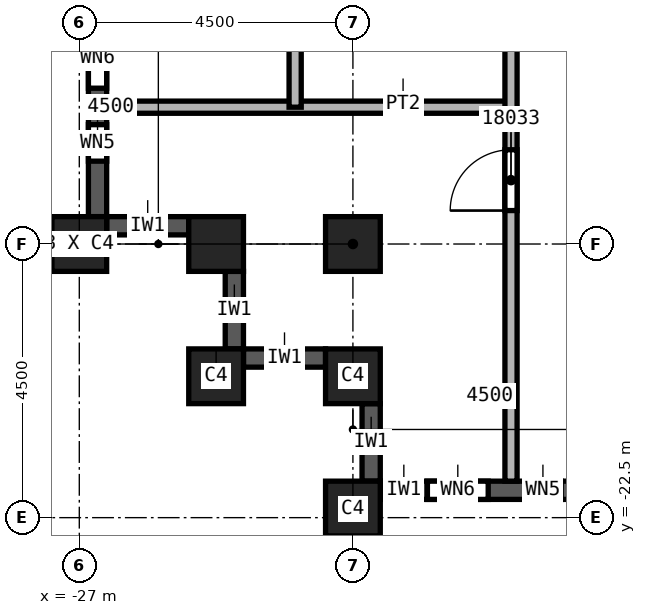
"""IFC4 building model, lengths in metres.
Left out: names, types, materials, properties, quantities, classifications, styles, units other than length and angle.
Written with IfcOpenShell. Run it as: python <this file> out.ifc"""

import sys

from ifc_helpers import new_model, si_unit, direction, frame, frame_2d, origin, origin_2d, place, context, subcontext, project, spatial, rectangle, extrude, element, fill, save


model = new_model("IFC4")
c1 = context("Model", 3, precision=1e-05, world=origin(), true_north=direction((0.0, 1.0)))
c2 = subcontext(c1, "Body", "Model", "MODEL_VIEW")
j1 = project(units=[si_unit("LENGTHUNIT", "METRE"), si_unit("PLANEANGLEUNIT", "RADIAN")], contexts=[c1])
p1 = place(None, origin())
s1 = spatial("IfcSite", under=j1, at=p1, CompositionType="ELEMENT")
p2 = place(p1, origin())
s2 = spatial("IfcBuilding", under=s1, at=p2, CompositionType="ELEMENT")
p3 = place(p2, frame((0.0, 0.0, 266.0)))
s3 = spatial("IfcBuildingStorey", under=s2, at=p3, CompositionType="ELEMENT", Elevation=266.0)
for number, where, z_axis, x_axis in (
    (1, (-22.5, -18.0, 0.0), (0.0, 0.0, 1.0), (1.0, 0.0, 0.0)),
    (2, (-22.5, -22.35, 0.0), (0.0, 0.0, 1.0), (1.0, 0.0, 0.0)),
    (3, (-27.0, -18.0, 0.0), (0.0, 0.0, 1.0), (0.0, 1.0, 0.0)),
    (4, (-22.5, -20.175, 0.0), (0.0, 0.0, 1.0), (1.0, 0.0, 0.0)),
    (5, (-24.75, -20.175, 0.0), (0.0, 0.0, 1.0), (1.0, 0.0, 0.0)),
    (6, (-24.75, -18.0, 0.0), (0.0, 0.0, 1.0), (1.0, 0.0, 0.0)),
):
    element("IfcColumn", number, at=place(p3, frame(where, z_axis=z_axis, x_axis=x_axis)), inside=s3, PredefinedType="COLUMN", context=c2, shape_type="SweptSolid", body=[
        extrude(rectangle(XDim=0.9, YDim=0.9, at=origin_2d()), origin(), (0.0, 0.0, 1.0), 3.72),
    ])
p4 = place(p3, frame((-26.7, -9.45, 0.0), z_axis=(0.0, 0.0, 1.0), x_axis=(0.0, -1.0, 0.0)))
e7 = element("IfcWall", 7, at=p4, inside=s3, PredefinedType="SOLIDWALL", context=c2, shape_type="SweptSolid", body=[
    extrude(rectangle(XDim=8.1, YDim=0.3, at=frame_2d((4.05, 0.0))), origin(), (0.0, 0.0, 1.0), 3.12),
])
p5 = place(p4, frame((0.825, 0.0, 0.8)))
e8 = element("IfcOpeningElement", 8, at=p5, cuts=e7, PredefinedType="OPENING", context=c2, shape_type="SweptSolid", body=[
    extrude(rectangle(XDim=2.4, YDim=1.95, at=frame_2d((1.2, 0.975))), frame((0.0, 0.15, 0.0), z_axis=(0.0, -1.0, 0.0), x_axis=(1.0, 0.0, 0.0)), (0.0, 0.0, 1.0), 0.3),
])
p6 = place(p4, frame((4.988, 0.0, 0.8)))
e9 = element("IfcOpeningElement", 9, at=p6, cuts=e7, PredefinedType="OPENING", context=c2, shape_type="SweptSolid", body=[
    extrude(rectangle(XDim=1.0, YDim=1.95, at=frame_2d((0.5, 0.975))), frame((0.0, 0.15, 0.0), z_axis=(0.0, -1.0, 0.0), x_axis=(1.0, 0.0, 0.0)), (0.0, 0.0, 1.0), 0.3),
])
p7 = place(p4, frame((6.587, 0.0, 0.8)))
e10 = element("IfcOpeningElement", 10, at=p7, cuts=e7, PredefinedType="OPENING", context=c2, shape_type="SweptSolid", body=[
    extrude(rectangle(XDim=0.6, YDim=1.95, at=frame_2d((0.3, 0.975))), frame((0.0, 0.15, 0.0), z_axis=(0.0, -1.0, 0.0), x_axis=(1.0, 0.0, 0.0)), (0.0, 0.0, 1.0), 0.3),
])
p8 = place(p3, frame((-26.55, -17.7, 0.0), z_axis=(0.0, 0.0, 1.0), x_axis=(1.0, 0.0, 0.0)))
e11 = element("IfcWall", 11, at=p8, inside=s3, PredefinedType="SOLIDWALL", context=c2, shape_type="SweptSolid", body=[
    extrude(rectangle(XDim=1.35, YDim=0.3, at=frame_2d((0.675, 0.0))), origin(), (0.0, 0.0, 1.0), 3.12),
])
p9 = place(p3, frame((-24.45, -18.45, 0.0), z_axis=(0.0, 0.0, 1.0), x_axis=(0.0, -1.0, 0.0)))
e12 = element("IfcWall", 12, at=p9, inside=s3, PredefinedType="SOLIDWALL", context=c2, shape_type="SweptSolid", body=[
    extrude(rectangle(XDim=1.275, YDim=0.3, at=frame_2d((0.638, 0.0))), origin(), (0.0, 0.0, 1.0), 3.12),
])
p10 = place(p3, frame((-24.3, -19.875, 0.0), z_axis=(0.0, 0.0, 1.0), x_axis=(1.0, 0.0, 0.0)))
e13 = element("IfcWall", 13, at=p10, inside=s3, PredefinedType="SOLIDWALL", context=c2, shape_type="SweptSolid", body=[
    extrude(rectangle(XDim=1.35, YDim=0.3, at=frame_2d((0.675, 0.0))), origin(), (0.0, 0.0, 1.0), 3.12),
])
p11 = place(p3, frame((-22.2, -20.625, 0.0), z_axis=(0.0, 0.0, 1.0), x_axis=(0.0, -1.0, 0.0)))
e14 = element("IfcWall", 14, at=p11, inside=s3, PredefinedType="SOLIDWALL", context=c2, shape_type="SweptSolid", body=[
    extrude(rectangle(XDim=1.275, YDim=0.3, at=frame_2d((0.637, 0.0))), origin(), (0.0, 0.0, 1.0), 3.12),
])
p12 = place(p3, frame((-22.05, -22.05, 0.0), z_axis=(0.0, 0.0, 1.0), x_axis=(1.0, 0.0, 0.0)))
e15 = element("IfcWall", 15, at=p12, inside=s3, PredefinedType="SOLIDWALL", context=c2, shape_type="SweptSolid", body=[
    extrude(rectangle(XDim=3.6, YDim=0.3, at=frame_2d((1.8, 0.0))), origin(), (0.0, 0.0, 1.0), 3.12),
])
p13 = place(p12, frame((0.775, 0.0, 0.8)))
e16 = element("IfcOpeningElement", 16, at=p13, cuts=e15, PredefinedType="OPENING", context=c2, shape_type="SweptSolid", body=[
    extrude(rectangle(XDim=1.0, YDim=1.95, at=frame_2d((0.5, 0.975))), frame((0.0, 0.15, 0.0), z_axis=(0.0, -1.0, 0.0), x_axis=(1.0, 0.0, 0.0)), (0.0, 0.0, 1.0), 0.3),
])
p14 = place(p12, frame((2.375, 0.0, 0.8)))
e17 = element("IfcOpeningElement", 17, at=p14, cuts=e15, PredefinedType="OPENING", context=c2, shape_type="SweptSolid", body=[
    extrude(rectangle(XDim=0.6, YDim=1.95, at=frame_2d((0.3, 0.975))), frame((0.0, 0.15, 0.0), z_axis=(0.0, -1.0, 0.0), x_axis=(1.0, 0.0, 0.0)), (0.0, 0.0, 1.0), 0.3),
])
p15 = place(p3, frame((-26.55, -15.75, 0.0), z_axis=(0.0, 0.0, 1.0), x_axis=(1.0, 0.0, 0.0)))
e18 = element("IfcWall", 18, at=p15, inside=s3, PredefinedType="PARTITIONING", context=c2, shape_type="SweptSolid", body=[
    extrude(rectangle(XDim=6.65, YDim=0.2, at=frame_2d((3.325, 0.0))), origin(), (0.0, 0.0, 1.0), 3.72),
])
p16 = place(p3, frame((-23.45, -15.75, 0.0), z_axis=(0.0, 0.0, 1.0), x_axis=(0.0, 1.0, 0.0)))
e19 = element("IfcWall", 19, at=p16, inside=s3, PredefinedType="PARTITIONING", context=c2, shape_type="SweptSolid", body=[
    extrude(rectangle(XDim=15.75, YDim=0.2, at=frame_2d((7.875, 0.0))), origin(), (0.0, 0.0, 1.0), 3.72),
])
p17 = place(p16, frame((7.6, 0.0, 0.0)))
e20 = element("IfcOpeningElement", 20, at=p17, cuts=e19, PredefinedType="OPENING", context=c2, shape_type="SweptSolid", body=[
    extrude(rectangle(XDim=1.0, YDim=2.1, at=frame_2d((0.5, 1.05))), frame((0.0, 0.1, 0.0), z_axis=(0.0, -1.0, 0.0), x_axis=(1.0, 0.0, 0.0)), (0.0, 0.0, 1.0), 0.2),
])
p18 = place(p3, frame((-19.9, -21.9, 0.0), z_axis=(0.0, 0.0, 1.0), x_axis=(0.0, 1.0, 0.0)))
e21 = element("IfcWall", 21, at=p18, inside=s3, PredefinedType="PARTITIONING", context=c2, shape_type="SweptSolid", body=[
    extrude(rectangle(XDim=35.5, YDim=0.2, at=frame_2d((17.75, 0.0))), origin(), (0.0, 0.0, 1.0), 3.72),
])
p19 = place(p18, frame((22.95, 0.0, 0.0)))
e22 = element("IfcOpeningElement", 22, at=p19, cuts=e21, PredefinedType="OPENING", context=c2, shape_type="SweptSolid", body=[
    extrude(rectangle(XDim=1.0, YDim=2.1, at=frame_2d((0.5, 1.05))), frame((0.0, 0.1, 0.0), z_axis=(0.0, -1.0, 0.0), x_axis=(1.0, 0.0, 0.0)), (0.0, 0.0, 1.0), 0.2),
])
p20 = place(p18, frame((28.8, 0.0, 0.0)))
e23 = element("IfcOpeningElement", 23, at=p20, cuts=e21, PredefinedType="OPENING", context=c2, shape_type="SweptSolid", body=[
    extrude(rectangle(XDim=1.0, YDim=2.1, at=frame_2d((0.5, 1.05))), frame((0.0, 0.1, 0.0), z_axis=(0.0, -1.0, 0.0), x_axis=(1.0, 0.0, 0.0)), (0.0, 0.0, 1.0), 0.2),
])
p21 = place(p18, frame((34.2, 0.0, 0.0)))
e24 = element("IfcOpeningElement", 24, at=p21, cuts=e21, PredefinedType="OPENING", context=c2, shape_type="SweptSolid", body=[
    extrude(rectangle(XDim=1.0, YDim=2.1, at=frame_2d((0.5, 1.05))), frame((0.0, 0.1, 0.0), z_axis=(0.0, -1.0, 0.0), x_axis=(1.0, 0.0, 0.0)), (0.0, 0.0, 1.0), 0.2),
])
p22 = place(p18, frame((4.45, 0.0, 0.0)))
e25 = element("IfcOpeningElement", 25, at=p22, cuts=e21, PredefinedType="OPENING", context=c2, shape_type="SweptSolid", body=[
    extrude(rectangle(XDim=1.0, YDim=2.1, at=frame_2d((0.5, 1.05))), frame((0.0, 0.1, 0.0), z_axis=(0.0, -1.0, 0.0), x_axis=(1.0, 0.0, 0.0)), (0.0, 0.0, 1.0), 0.2),
])
p23 = place(p18, frame((14.4, 0.0, 0.0)))
e26 = element("IfcOpeningElement", 26, at=p23, cuts=e21, PredefinedType="OPENING", context=c2, shape_type="SweptSolid", body=[
    extrude(rectangle(XDim=1.0, YDim=2.1, at=frame_2d((0.5, 1.05))), frame((0.0, 0.1, 0.0), z_axis=(0.0, -1.0, 0.0), x_axis=(1.0, 0.0, 0.0)), (0.0, 0.0, 1.0), 0.2),
])
p24 = place(p22, origin())
e27 = element("IfcDoor", 27, at=p24, inside=s3, OperationType="SINGLE_SWING_RIGHT", PredefinedType="DOOR", context=c2, shape_type="SweptSolid", body=[
    extrude(rectangle(XDim=1.0, YDim=2.1, at=frame_2d((0.5, 1.05))), frame((0.0, 0.025, 0.0), z_axis=(0.0, -1.0, 0.0), x_axis=(1.0, 0.0, 0.0)), (0.0, 0.0, 1.0), 0.05),
])
fill(e25, e27)
p25 = place(p6, origin())
e28 = element("IfcWindow", 28, at=p25, inside=s3, PartitioningType="SINGLE_PANEL", PredefinedType="WINDOW", context=c2, shape_type="SweptSolid", body=[
    extrude(rectangle(XDim=1.0, YDim=1.95, at=frame_2d((0.5, 0.975))), frame((0.0, 0.03, 0.0), z_axis=(0.0, -1.0, 0.0), x_axis=(1.0, 0.0, 0.0)), (0.0, 0.0, 1.0), 0.06),
])
fill(e9, e28)
p26 = place(p7, origin())
e29 = element("IfcWindow", 29, at=p26, inside=s3, PartitioningType="SINGLE_PANEL", PredefinedType="WINDOW", context=c2, shape_type="SweptSolid", body=[
    extrude(rectangle(XDim=0.6, YDim=1.95, at=frame_2d((0.3, 0.975))), frame((0.0, 0.03, 0.0), z_axis=(0.0, -1.0, 0.0), x_axis=(1.0, 0.0, 0.0)), (0.0, 0.0, 1.0), 0.06),
])
fill(e10, e29)
p27 = place(p13, origin())
e30 = element("IfcWindow", 30, at=p27, inside=s3, PartitioningType="SINGLE_PANEL", PredefinedType="WINDOW", context=c2, shape_type="SweptSolid", body=[
    extrude(rectangle(XDim=1.0, YDim=1.95, at=frame_2d((0.5, 0.975))), frame((0.0, 0.03, 0.0), z_axis=(0.0, -1.0, 0.0), x_axis=(1.0, 0.0, 0.0)), (0.0, 0.0, 1.0), 0.06),
])
fill(e16, e30)
p28 = place(p14, origin())
e31 = element("IfcWindow", 31, at=p28, inside=s3, PartitioningType="SINGLE_PANEL", PredefinedType="WINDOW", context=c2, shape_type="SweptSolid", body=[
    extrude(rectangle(XDim=0.6, YDim=1.95, at=frame_2d((0.3, 0.975))), frame((0.0, 0.03, 0.0), z_axis=(0.0, -1.0, 0.0), x_axis=(1.0, 0.0, 0.0)), (0.0, 0.0, 1.0), 0.06),
])
fill(e17, e31)
save(model, sys.argv[1])
